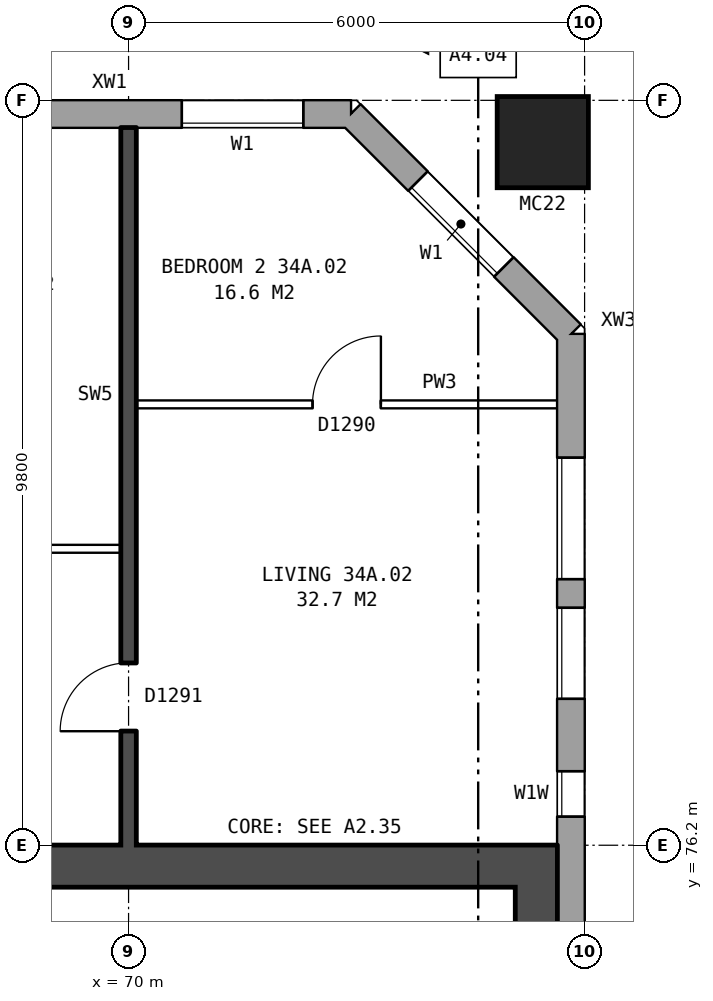
"""IFC4 building model, lengths in metres.
Left out: names, types, materials, properties, quantities, classifications, styles, units other than length and angle.
Written with IfcOpenShell. Run it as: python <this file> out.ifc"""

import sys

from ifc_helpers import new_model, si_unit, direction, frame, frame_2d, origin, origin_2d, place, context, subcontext, project, spatial, rectangle, hollow_rectangle, extrude, element, fill, save


model = new_model("IFC4")
c1 = context("Model", 3, precision=1e-05, world=origin(), true_north=direction((0.0, 1.0)))
c2 = subcontext(c1, "Body", "Model", "MODEL_VIEW")
j1 = project(units=[si_unit("LENGTHUNIT", "METRE"), si_unit("PLANEANGLEUNIT", "RADIAN")], contexts=[c1])
p1 = place(None, origin())
s1 = spatial("IfcSite", under=j1, at=p1, CompositionType="ELEMENT")
p2 = place(p1, origin())
s2 = spatial("IfcBuilding", under=s1, at=p2, CompositionType="ELEMENT")
p3 = place(p2, frame((0.0, 0.0, 123.7)))
s3 = spatial("IfcBuildingStorey", under=s2, at=p3, CompositionType="ELEMENT", Elevation=123.7)
p4 = place(p3, frame((75.45, 85.45, 0.0), z_axis=(0.0, 0.0, 1.0), x_axis=(1.0, 0.0, 0.0)))
e1 = element("IfcColumn", 1, at=p4, inside=s3, PredefinedType="COLUMN", context=c2, shape_type="SweptSolid", body=[
    extrude(hollow_rectangle(XDim=1.2, YDim=1.2, WallThickness=0.065, at=origin_2d()), origin(), (0.0, 0.0, 1.0), 3.1),
])
p5 = place(p3, frame((75.82, 57.075, 0.0), z_axis=(0.0, 0.0, 1.0), x_axis=(0.0, 1.0, 0.0)))
e2 = element("IfcWall", 2, at=p5, inside=s3, PredefinedType="STANDARD", context=c2, shape_type="SweptSolid", body=[
    extrude(rectangle(XDim=25.851, YDim=0.36, at=frame_2d((12.925, 0.0))), origin(), (0.0, 0.0, 1.0), 2.85),
])
p6 = place(p5, frame((1.625, 0.0, 0.8)))
e3 = element("IfcOpeningElement", 3, at=p6, cuts=e2, PredefinedType="OPENING", context=c2, shape_type="SweptSolid", body=[
    extrude(rectangle(XDim=1.6, YDim=1.8, at=frame_2d((0.8, 0.9))), frame((0.0, 0.19, 0.0), z_axis=(0.0, -1.0, 0.0), x_axis=(1.0, 0.0, 0.0)), (0.0, 0.0, 1.0), 0.38),
])
p7 = place(p5, frame((3.525, 0.0, 1.7)))
e4 = element("IfcOpeningElement", 4, at=p7, cuts=e2, PredefinedType="OPENING", context=c2, shape_type="SweptSolid", body=[
    extrude(rectangle(XDim=1.2, YDim=0.9, at=frame_2d((0.6, 0.45))), frame((0.0, 0.19, 0.0), z_axis=(0.0, -1.0, 0.0), x_axis=(1.0, 0.0, 0.0)), (0.0, 0.0, 1.0), 0.38),
])
p8 = place(p5, frame((19.5, 0.0, 0.8)))
e5 = element("IfcOpeningElement", 5, at=p8, cuts=e2, PredefinedType="OPENING", context=c2, shape_type="SweptSolid", body=[
    extrude(rectangle(XDim=0.6, YDim=0.9, at=frame_2d((0.3, 0.45))), frame((0.0, 0.19, 0.0), z_axis=(0.0, -1.0, 0.0), x_axis=(1.0, 0.0, 0.0)), (0.0, 0.0, 1.0), 0.38),
])
p9 = place(p5, frame((22.625, 0.0, 0.8)))
e6 = element("IfcOpeningElement", 6, at=p9, cuts=e2, PredefinedType="OPENING", context=c2, shape_type="SweptSolid", body=[
    extrude(rectangle(XDim=1.6, YDim=1.8, at=frame_2d((0.8, 0.9))), frame((0.0, 0.19, 0.0), z_axis=(0.0, -1.0, 0.0), x_axis=(1.0, 0.0, 0.0)), (0.0, 0.0, 1.0), 0.38),
])
p10 = place(p5, frame((21.05, 0.0, 1.7)))
e7 = element("IfcOpeningElement", 7, at=p10, cuts=e2, PredefinedType="OPENING", context=c2, shape_type="SweptSolid", body=[
    extrude(rectangle(XDim=1.2, YDim=0.9, at=frame_2d((0.6, 0.45))), frame((0.0, 0.19, 0.0), z_axis=(0.0, -1.0, 0.0), x_axis=(1.0, 0.0, 0.0)), (0.0, 0.0, 1.0), 0.38),
])
p11 = place(p3, frame((75.82, 82.925, 0.0), z_axis=(0.0, 0.0, 1.0), x_axis=(-0.707106781187, 0.707106781187, 0.0)))
e8 = element("IfcWall", 8, at=p11, inside=s3, PredefinedType="STANDARD", context=c2, shape_type="SweptSolid", body=[
    extrude(rectangle(XDim=4.094, YDim=0.36, at=frame_2d((2.047, 0.0))), origin(), (0.0, 0.0, 1.0), 2.85),
])
p12 = place(p11, frame((1.247, 0.0, 0.8)))
e9 = element("IfcOpeningElement", 9, at=p12, cuts=e8, PredefinedType="OPENING", context=c2, shape_type="SweptSolid", body=[
    extrude(rectangle(XDim=1.6, YDim=1.8, at=frame_2d((0.8, 0.9))), frame((0.0, 0.19, 0.0), z_axis=(0.0, -1.0, 0.0), x_axis=(1.0, 0.0, 0.0)), (0.0, 0.0, 1.0), 0.38),
])
p13 = place(p3, frame((72.925, 85.82, 0.0), z_axis=(0.0, 0.0, 1.0), x_axis=(-1.0, 0.0, 0.0)))
e10 = element("IfcWall", 10, at=p13, inside=s3, PredefinedType="STANDARD", context=c2, shape_type="SweptSolid", body=[
    extrude(rectangle(XDim=43.101, YDim=0.36, at=frame_2d((21.55, 0.0))), origin(), (0.0, 0.0, 1.0), 2.85),
])
p14 = place(p13, frame((0.625, 0.0, 0.8)))
e11 = element("IfcOpeningElement", 11, at=p14, cuts=e10, PredefinedType="OPENING", context=c2, shape_type="SweptSolid", body=[
    extrude(rectangle(XDim=1.6, YDim=1.8, at=frame_2d((0.8, 0.9))), frame((0.0, 0.19, 0.0), z_axis=(0.0, -1.0, 0.0), x_axis=(1.0, 0.0, 0.0)), (0.0, 0.0, 1.0), 0.38),
])
p15 = place(p13, frame((4.125, 0.0, 0.8)))
e12 = element("IfcOpeningElement", 12, at=p15, cuts=e10, PredefinedType="OPENING", context=c2, shape_type="SweptSolid", body=[
    extrude(rectangle(XDim=0.6, YDim=0.9, at=frame_2d((0.3, 0.45))), frame((0.0, 0.19, 0.0), z_axis=(0.0, -1.0, 0.0), x_axis=(1.0, 0.0, 0.0)), (0.0, 0.0, 1.0), 0.38),
])
p16 = place(p13, frame((6.625, 0.0, 0.8)))
e13 = element("IfcOpeningElement", 13, at=p16, cuts=e10, PredefinedType="OPENING", context=c2, shape_type="SweptSolid", body=[
    extrude(rectangle(XDim=1.6, YDim=1.8, at=frame_2d((0.8, 0.9))), frame((0.0, 0.19, 0.0), z_axis=(0.0, -1.0, 0.0), x_axis=(1.0, 0.0, 0.0)), (0.0, 0.0, 1.0), 0.38),
])
p17 = place(p13, frame((9.625, 0.0, 0.8)))
e14 = element("IfcOpeningElement", 14, at=p17, cuts=e10, PredefinedType="OPENING", context=c2, shape_type="SweptSolid", body=[
    extrude(rectangle(XDim=1.6, YDim=1.8, at=frame_2d((0.8, 0.9))), frame((0.0, 0.19, 0.0), z_axis=(0.0, -1.0, 0.0), x_axis=(1.0, 0.0, 0.0)), (0.0, 0.0, 1.0), 0.38),
])
p18 = place(p13, frame((12.625, 0.0, 0.8)))
e15 = element("IfcOpeningElement", 15, at=p18, cuts=e10, PredefinedType="OPENING", context=c2, shape_type="SweptSolid", body=[
    extrude(rectangle(XDim=1.6, YDim=1.8, at=frame_2d((0.8, 0.9))), frame((0.0, 0.19, 0.0), z_axis=(0.0, -1.0, 0.0), x_axis=(1.0, 0.0, 0.0)), (0.0, 0.0, 1.0), 0.38),
])
p19 = place(p13, frame((15.625, 0.0, 0.8)))
e16 = element("IfcOpeningElement", 16, at=p19, cuts=e10, PredefinedType="OPENING", context=c2, shape_type="SweptSolid", body=[
    extrude(rectangle(XDim=1.6, YDim=1.8, at=frame_2d((0.8, 0.9))), frame((0.0, 0.19, 0.0), z_axis=(0.0, -1.0, 0.0), x_axis=(1.0, 0.0, 0.0)), (0.0, 0.0, 1.0), 0.38),
])
p20 = place(p13, frame((18.625, 0.0, 0.8)))
e17 = element("IfcOpeningElement", 17, at=p20, cuts=e10, PredefinedType="OPENING", context=c2, shape_type="SweptSolid", body=[
    extrude(rectangle(XDim=1.6, YDim=1.8, at=frame_2d((0.8, 0.9))), frame((0.0, 0.19, 0.0), z_axis=(0.0, -1.0, 0.0), x_axis=(1.0, 0.0, 0.0)), (0.0, 0.0, 1.0), 0.38),
])
p21 = place(p13, frame((21.625, 0.0, 0.8)))
e18 = element("IfcOpeningElement", 18, at=p21, cuts=e10, PredefinedType="OPENING", context=c2, shape_type="SweptSolid", body=[
    extrude(rectangle(XDim=1.6, YDim=1.8, at=frame_2d((0.8, 0.9))), frame((0.0, 0.19, 0.0), z_axis=(0.0, -1.0, 0.0), x_axis=(1.0, 0.0, 0.0)), (0.0, 0.0, 1.0), 0.38),
])
p22 = place(p13, frame((24.625, 0.0, 0.8)))
e19 = element("IfcOpeningElement", 19, at=p22, cuts=e10, PredefinedType="OPENING", context=c2, shape_type="SweptSolid", body=[
    extrude(rectangle(XDim=1.6, YDim=1.8, at=frame_2d((0.8, 0.9))), frame((0.0, 0.19, 0.0), z_axis=(0.0, -1.0, 0.0), x_axis=(1.0, 0.0, 0.0)), (0.0, 0.0, 1.0), 0.38),
])
p23 = place(p13, frame((27.625, 0.0, 0.8)))
e20 = element("IfcOpeningElement", 20, at=p23, cuts=e10, PredefinedType="OPENING", context=c2, shape_type="SweptSolid", body=[
    extrude(rectangle(XDim=1.6, YDim=1.8, at=frame_2d((0.8, 0.9))), frame((0.0, 0.19, 0.0), z_axis=(0.0, -1.0, 0.0), x_axis=(1.0, 0.0, 0.0)), (0.0, 0.0, 1.0), 0.38),
])
p24 = place(p13, frame((30.625, 0.0, 0.8)))
e21 = element("IfcOpeningElement", 21, at=p24, cuts=e10, PredefinedType="OPENING", context=c2, shape_type="SweptSolid", body=[
    extrude(rectangle(XDim=1.6, YDim=1.8, at=frame_2d((0.8, 0.9))), frame((0.0, 0.19, 0.0), z_axis=(0.0, -1.0, 0.0), x_axis=(1.0, 0.0, 0.0)), (0.0, 0.0, 1.0), 0.38),
])
p25 = place(p13, frame((33.625, 0.0, 0.8)))
e22 = element("IfcOpeningElement", 22, at=p25, cuts=e10, PredefinedType="OPENING", context=c2, shape_type="SweptSolid", body=[
    extrude(rectangle(XDim=1.6, YDim=1.8, at=frame_2d((0.8, 0.9))), frame((0.0, 0.19, 0.0), z_axis=(0.0, -1.0, 0.0), x_axis=(1.0, 0.0, 0.0)), (0.0, 0.0, 1.0), 0.38),
])
p26 = place(p13, frame((36.625, 0.0, 0.8)))
e23 = element("IfcOpeningElement", 23, at=p26, cuts=e10, PredefinedType="OPENING", context=c2, shape_type="SweptSolid", body=[
    extrude(rectangle(XDim=1.6, YDim=1.8, at=frame_2d((0.8, 0.9))), frame((0.0, 0.19, 0.0), z_axis=(0.0, -1.0, 0.0), x_axis=(1.0, 0.0, 0.0)), (0.0, 0.0, 1.0), 0.38),
])
p27 = place(p13, frame((40.125, 0.0, 1.7)))
e24 = element("IfcOpeningElement", 24, at=p27, cuts=e10, PredefinedType="OPENING", context=c2, shape_type="SweptSolid", body=[
    extrude(rectangle(XDim=0.6, YDim=0.9, at=frame_2d((0.3, 0.45))), frame((0.0, 0.19, 0.0), z_axis=(0.0, -1.0, 0.0), x_axis=(1.0, 0.0, 0.0)), (0.0, 0.0, 1.0), 0.38),
])
p28 = place(p13, frame((5.125, 0.0, 0.8)))
e25 = element("IfcOpeningElement", 25, at=p28, cuts=e10, PredefinedType="OPENING", context=c2, shape_type="SweptSolid", body=[
    extrude(rectangle(XDim=1.2, YDim=1.8, at=frame_2d((0.6, 0.9))), frame((0.0, 0.19, 0.0), z_axis=(0.0, -1.0, 0.0), x_axis=(1.0, 0.0, 0.0)), (0.0, 0.0, 1.0), 0.38),
])
p29 = place(p13, frame((41.125, 0.0, 0.8)))
e26 = element("IfcOpeningElement", 26, at=p29, cuts=e10, PredefinedType="OPENING", context=c2, shape_type="SweptSolid", body=[
    extrude(rectangle(XDim=1.6, YDim=1.8, at=frame_2d((0.8, 0.9))), frame((0.0, 0.19, 0.0), z_axis=(0.0, -1.0, 0.0), x_axis=(1.0, 0.0, 0.0)), (0.0, 0.0, 1.0), 0.38),
])
p30 = place(p3, frame((75.365, 63.8, 0.0), z_axis=(0.0, 0.0, 1.0), x_axis=(0.0, 1.0, 0.0)))
e27 = element("IfcWall", 27, at=p30, inside=s3, PredefinedType="SHEAR", context=c2, shape_type="SweptSolid", body=[
    extrude(rectangle(XDim=12.4, YDim=0.55, at=frame_2d((6.2, 0.0))), origin(), (0.0, 0.0, 1.0), 2.85),
])
p31 = place(p3, frame((67.19, 75.925, 0.0), z_axis=(0.0, 0.0, 1.0), x_axis=(1.0, 0.0, 0.0)))
e28 = element("IfcWall", 28, at=p31, inside=s3, PredefinedType="SHEAR", context=c2, shape_type="SweptSolid", body=[
    extrude(rectangle(XDim=7.9, YDim=0.55, at=frame_2d((3.95, 0.0))), origin(), (0.0, 0.0, 1.0), 2.85),
])
p32 = place(p3, frame((64.1, 80.1, 0.0), z_axis=(0.0, 0.0, 1.0), x_axis=(1.0, 0.0, 0.0)))
e29 = element("IfcWall", 29, at=p32, inside=s3, PredefinedType="PARTITIONING", context=c2, shape_type="SweptSolid", body=[
    extrude(rectangle(XDim=5.8, YDim=0.1, at=frame_2d((2.9, 0.0))), origin(), (0.0, 0.0, 1.0), 2.85),
])
p33 = place(p32, frame((3.6, 0.0, 0.0)))
e30 = element("IfcOpeningElement", 30, at=p33, cuts=e29, PredefinedType="OPENING", context=c2, shape_type="SweptSolid", body=[
    extrude(rectangle(XDim=0.9, YDim=2.1, at=frame_2d((0.45, 1.05))), frame((0.0, 0.06, 0.0), z_axis=(0.0, -1.0, 0.0), x_axis=(1.0, 0.0, 0.0)), (0.0, 0.0, 1.0), 0.12),
])
p34 = place(p32, frame((0.7, 0.0, 0.0)))
e31 = element("IfcOpeningElement", 31, at=p34, cuts=e29, PredefinedType="OPENING", context=c2, shape_type="SweptSolid", body=[
    extrude(rectangle(XDim=0.9, YDim=2.1, at=frame_2d((0.45, 1.05))), frame((0.0, 0.06, 0.0), z_axis=(0.0, -1.0, 0.0), x_axis=(1.0, 0.0, 0.0)), (0.0, 0.0, 1.0), 0.12),
])
p35 = place(p3, frame((70.1, 82.0, 0.0), z_axis=(0.0, 0.0, 1.0), x_axis=(1.0, 0.0, 0.0)))
e32 = element("IfcWall", 32, at=p35, inside=s3, PredefinedType="PARTITIONING", context=c2, shape_type="SweptSolid", body=[
    extrude(rectangle(XDim=5.54, YDim=0.1, at=frame_2d((2.77, 0.0))), origin(), (0.0, 0.0, 1.0), 2.85),
])
p36 = place(p35, frame((2.32, 0.0, 0.0)))
e33 = element("IfcOpeningElement", 33, at=p36, cuts=e32, PredefinedType="OPENING", context=c2, shape_type="SweptSolid", body=[
    extrude(rectangle(XDim=0.9, YDim=2.1, at=frame_2d((0.45, 1.05))), frame((0.0, 0.06, 0.0), z_axis=(0.0, -1.0, 0.0), x_axis=(1.0, 0.0, 0.0)), (0.0, 0.0, 1.0), 0.12),
])
p37 = place(p3, frame((70.0, 76.2, 0.0), z_axis=(0.0, 0.0, 1.0), x_axis=(0.0, 1.0, 0.0)))
e34 = element("IfcWall", 34, at=p37, inside=s3, PredefinedType="SOLIDWALL", context=c2, shape_type="SweptSolid", body=[
    extrude(rectangle(XDim=9.44, YDim=0.2, at=frame_2d((4.72, 0.0))), origin(), (0.0, 0.0, 1.0), 2.85),
])
p38 = place(p37, frame((1.5, 0.0, 0.0)))
e35 = element("IfcOpeningElement", 35, at=p38, cuts=e34, PredefinedType="OPENING", context=c2, shape_type="SweptSolid", body=[
    extrude(rectangle(XDim=0.9, YDim=2.1, at=frame_2d((0.45, 1.05))), frame((0.0, 0.11, 0.0), z_axis=(0.0, -1.0, 0.0), x_axis=(1.0, 0.0, 0.0)), (0.0, 0.0, 1.0), 0.22),
])
p39 = place(p8, origin())
e36 = element("IfcWindow", 36, at=p39, inside=s3, PartitioningType="SINGLE_PANEL", PredefinedType="WINDOW", context=c2, shape_type="SweptSolid", body=[
    extrude(rectangle(XDim=0.6, YDim=0.9, at=frame_2d((0.3, 0.45))), frame((0.0, 0.15, 0.0), z_axis=(0.0, -1.0, 0.0), x_axis=(1.0, 0.0, 0.0)), (0.0, 0.0, 1.0), 0.06),
])
fill(e5, e36)
p40 = place(p9, origin())
e37 = element("IfcWindow", 37, at=p40, inside=s3, PartitioningType="SINGLE_PANEL", PredefinedType="WINDOW", context=c2, shape_type="SweptSolid", body=[
    extrude(rectangle(XDim=1.6, YDim=1.8, at=frame_2d((0.8, 0.9))), frame((0.0, 0.15, 0.0), z_axis=(0.0, -1.0, 0.0), x_axis=(1.0, 0.0, 0.0)), (0.0, 0.0, 1.0), 0.06),
])
fill(e6, e37)
p41 = place(p12, origin())
e38 = element("IfcWindow", 38, at=p41, inside=s3, PartitioningType="SINGLE_PANEL", PredefinedType="WINDOW", context=c2, shape_type="SweptSolid", body=[
    extrude(rectangle(XDim=1.6, YDim=1.8, at=frame_2d((0.8, 0.9))), frame((0.0, 0.15, 0.0), z_axis=(0.0, -1.0, 0.0), x_axis=(1.0, 0.0, 0.0)), (0.0, 0.0, 1.0), 0.06),
])
fill(e9, e38)
p42 = place(p14, origin())
e39 = element("IfcWindow", 39, at=p42, inside=s3, PartitioningType="SINGLE_PANEL", PredefinedType="WINDOW", context=c2, shape_type="SweptSolid", body=[
    extrude(rectangle(XDim=1.6, YDim=1.8, at=frame_2d((0.8, 0.9))), frame((0.0, 0.15, 0.0), z_axis=(0.0, -1.0, 0.0), x_axis=(1.0, 0.0, 0.0)), (0.0, 0.0, 1.0), 0.06),
])
fill(e11, e39)
p43 = place(p36, origin())
e40 = element("IfcDoor", 40, at=p43, inside=s3, OperationType="SINGLE_SWING_RIGHT", PredefinedType="DOOR", context=c2, shape_type="SweptSolid", body=[
    extrude(rectangle(XDim=0.9, YDim=2.1, at=frame_2d((0.45, 1.05))), frame((0.0, 0.025, 0.0), z_axis=(0.0, -1.0, 0.0), x_axis=(1.0, 0.0, 0.0)), (0.0, 0.0, 1.0), 0.05),
])
fill(e33, e40)
p44 = place(p38, origin())
e41 = element("IfcDoor", 41, at=p44, inside=s3, OperationType="SINGLE_SWING_LEFT", PredefinedType="DOOR", context=c2, shape_type="SweptSolid", body=[
    extrude(rectangle(XDim=0.9, YDim=2.1, at=frame_2d((0.45, 1.05))), frame((0.0, 0.025, 0.0), z_axis=(0.0, -1.0, 0.0), x_axis=(1.0, 0.0, 0.0)), (0.0, 0.0, 1.0), 0.05),
])
fill(e35, e41)
p45 = place(p10, origin())
e42 = element("IfcWindow", 42, at=p45, inside=s3, PartitioningType="SINGLE_PANEL", PredefinedType="WINDOW", context=c2, shape_type="SweptSolid", body=[
    extrude(rectangle(XDim=1.2, YDim=0.9, at=frame_2d((0.6, 0.45))), frame((0.0, 0.15, 0.0), z_axis=(0.0, -1.0, 0.0), x_axis=(1.0, 0.0, 0.0)), (0.0, 0.0, 1.0), 0.06),
])
fill(e7, e42)
save(model, sys.argv[1])
